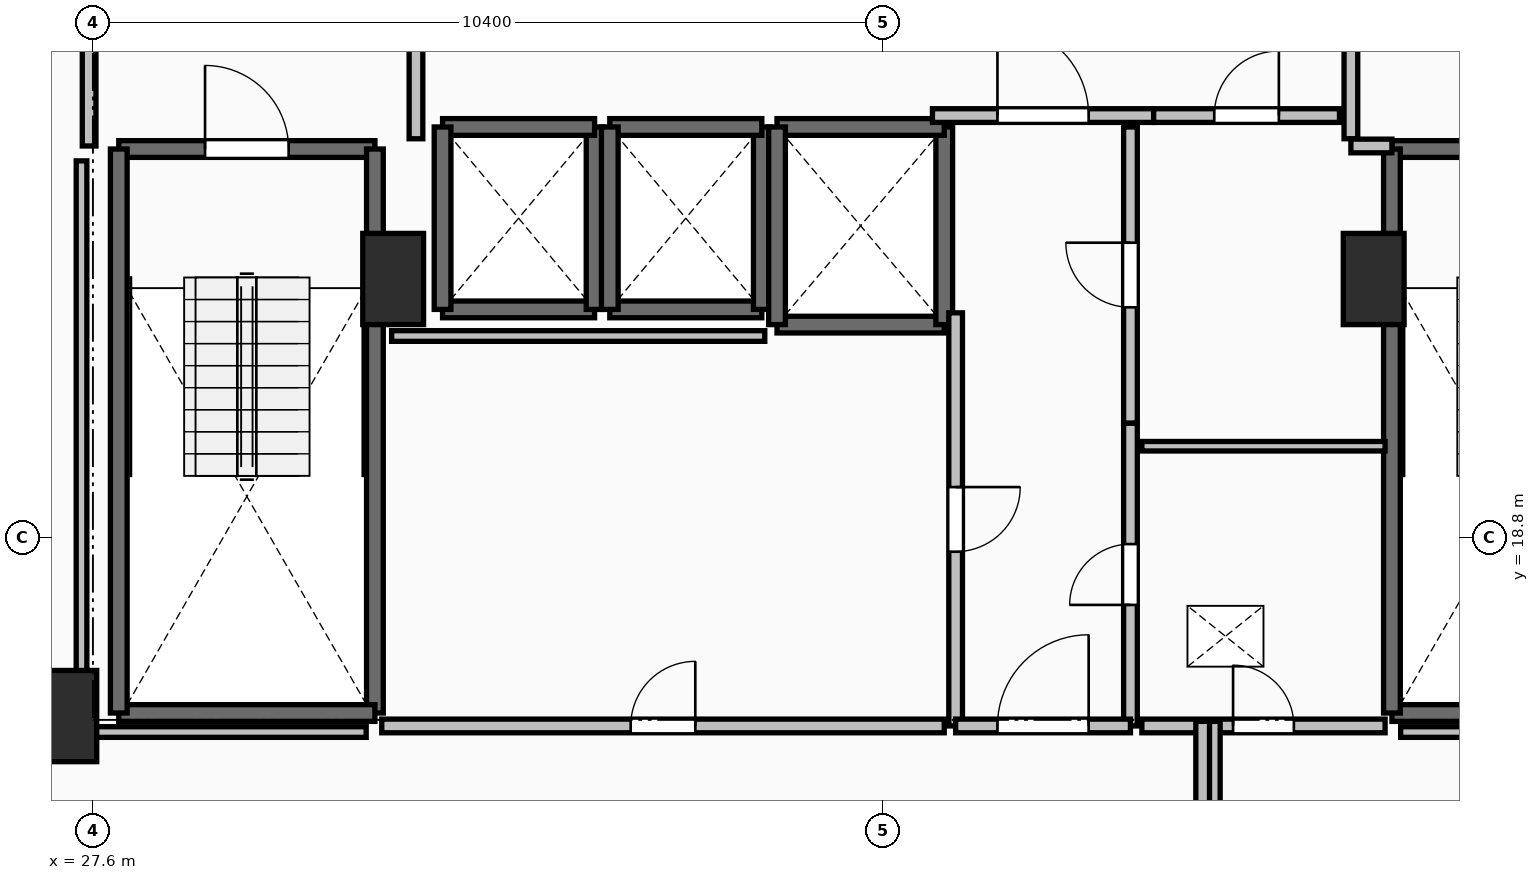
"""IFC4 building model, lengths in metres.
Left out: names, types, materials, properties, quantities, classifications, styles, units other than length and angle.
Written with IfcOpenShell. Run it as: python <this file> out.ifc"""

import sys

from ifc_helpers import new_model, si_unit, direction, frame, frame_2d, origin, origin_2d, place, context, subcontext, project, spatial, rectangle, extrude, element, fill, save


model = new_model("IFC4")
c1 = context("Model", 3, precision=1e-05, world=origin(), true_north=direction((0.0, 1.0)))
c2 = subcontext(c1, "Body", "Model", "MODEL_VIEW")
j1 = project(units=[si_unit("LENGTHUNIT", "METRE"), si_unit("PLANEANGLEUNIT", "RADIAN")], contexts=[c1])
p1 = place(None, origin())
s1 = spatial("IfcSite", under=j1, at=p1, CompositionType="ELEMENT")
p2 = place(p1, origin())
s2 = spatial("IfcBuilding", under=s1, at=p2, CompositionType="ELEMENT")
p3 = place(p2, frame((0.0, 0.0, 96.3)))
s3 = spatial("IfcBuildingStorey", under=s2, at=p3, CompositionType="ELEMENT", Elevation=96.3)
for number, where, z_axis, x_axis in (
    (1, (27.25, 16.45, 0.0), (0.0, 0.0, 1.0), (1.0, 0.0, 0.0)),
    (2, (31.55, 22.2, 0.0), (0.0, 0.0, 1.0), (1.0, 0.0, 0.0)),
    (3, (44.45, 22.2, 0.0), (0.0, 0.0, 1.0), (1.0, 0.0, 0.0)),
):
    element("IfcColumn", number, at=place(p3, frame(where, z_axis=z_axis, x_axis=x_axis)), inside=s3, PredefinedType="PILASTER", context=c2, shape_type="SweptSolid", body=[
        extrude(rectangle(XDim=0.8, YDim=1.2, at=origin_2d()), origin(), (0.0, 0.0, 1.0), 3.5),
    ])
p4 = place(p3, frame((27.94, 23.91, 0.0), z_axis=(0.0, 0.0, 1.0), x_axis=(1.0, 0.0, 0.0)))
e4 = element("IfcWall", 4, at=p4, inside=s3, PredefinedType="SOLIDWALL", context=c2, shape_type="SweptSolid", body=[
    extrude(rectangle(XDim=3.37, YDim=0.22, at=frame_2d((1.685, 0.0))), origin(), (0.0, 0.0, 1.0), 3.24),
])
p5 = place(p4, frame((1.135, 0.0, 0.0)))
e5 = element("IfcOpeningElement", 5, at=p5, cuts=e4, PredefinedType="OPENING", context=c2, shape_type="SweptSolid", body=[
    extrude(rectangle(XDim=1.1, YDim=2.15, at=frame_2d((0.55, 1.075))), frame((0.0, 0.125, 0.0), z_axis=(0.0, -1.0, 0.0), x_axis=(1.0, 0.0, 0.0)), (0.0, 0.0, 1.0), 0.25),
])
p6 = place(p3, frame((31.31, 23.91, 0.0), z_axis=(0.0, 0.0, 1.0), x_axis=(0.0, -1.0, 0.0)))
e6 = element("IfcWall", 6, at=p6, inside=s3, PredefinedType="SOLIDWALL", context=c2, shape_type="SweptSolid", body=[
    extrude(rectangle(XDim=7.42, YDim=0.22, at=frame_2d((3.71, 0.0))), origin(), (0.0, 0.0, 1.0), 3.24),
])
p7 = place(p3, frame((31.31, 16.49, 0.0), z_axis=(0.0, 0.0, 1.0), x_axis=(-1.0, 0.0, 0.0)))
e7 = element("IfcWall", 7, at=p7, inside=s3, PredefinedType="SOLIDWALL", context=c2, shape_type="SweptSolid", body=[
    extrude(rectangle(XDim=3.37, YDim=0.22, at=frame_2d((1.685, 0.0))), origin(), (0.0, 0.0, 1.0), 3.24),
])
p8 = place(p3, frame((27.94, 16.49, 0.0), z_axis=(0.0, 0.0, 1.0), x_axis=(0.0, 1.0, 0.0)))
e8 = element("IfcWall", 8, at=p8, inside=s3, PredefinedType="SOLIDWALL", context=c2, shape_type="SweptSolid", body=[
    extrude(rectangle(XDim=7.42, YDim=0.22, at=frame_2d((3.71, 0.0))), origin(), (0.0, 0.0, 1.0), 3.24),
])
p9 = place(p3, frame((44.69, 23.91, 0.0), z_axis=(0.0, 0.0, 1.0), x_axis=(1.0, 0.0, 0.0)))
e9 = element("IfcWall", 9, at=p9, inside=s3, PredefinedType="SOLIDWALL", context=c2, shape_type="SweptSolid", body=[
    extrude(rectangle(XDim=3.37, YDim=0.22, at=frame_2d((1.685, 0.0))), origin(), (0.0, 0.0, 1.0), 3.24),
])
p10 = place(p9, frame((1.135, 0.0, 0.0)))
e10 = element("IfcOpeningElement", 10, at=p10, cuts=e9, PredefinedType="OPENING", context=c2, shape_type="SweptSolid", body=[
    extrude(rectangle(XDim=1.1, YDim=2.15, at=frame_2d((0.55, 1.075))), frame((0.0, 0.125, 0.0), z_axis=(0.0, -1.0, 0.0), x_axis=(1.0, 0.0, 0.0)), (0.0, 0.0, 1.0), 0.25),
])
p11 = place(p3, frame((48.06, 16.49, 0.0), z_axis=(0.0, 0.0, 1.0), x_axis=(-1.0, 0.0, 0.0)))
e11 = element("IfcWall", 11, at=p11, inside=s3, PredefinedType="SOLIDWALL", context=c2, shape_type="SweptSolid", body=[
    extrude(rectangle(XDim=3.37, YDim=0.22, at=frame_2d((1.685, 0.0))), origin(), (0.0, 0.0, 1.0), 3.24),
])
p12 = place(p3, frame((44.69, 16.49, 0.0), z_axis=(0.0, 0.0, 1.0), x_axis=(0.0, 1.0, 0.0)))
e12 = element("IfcWall", 12, at=p12, inside=s3, PredefinedType="SOLIDWALL", context=c2, shape_type="SweptSolid", body=[
    extrude(rectangle(XDim=7.42, YDim=0.22, at=frame_2d((3.71, 0.0))), origin(), (0.0, 0.0, 1.0), 3.24),
])
p13 = place(p3, frame((32.2, 21.8, 0.0), z_axis=(0.0, 0.0, 1.0), x_axis=(1.0, 0.0, 0.0)))
e13 = element("IfcWall", 13, at=p13, inside=s3, PredefinedType="SOLIDWALL", context=c2, shape_type="SweptSolid", body=[
    extrude(rectangle(XDim=2.0, YDim=0.22, at=frame_2d((1.0, 0.0))), origin(), (0.0, 0.0, 1.0), 3.24),
])
p14 = place(p3, frame((34.2, 21.8, 0.0), z_axis=(0.0, 0.0, 1.0), x_axis=(0.0, 1.0, 0.0)))
e14 = element("IfcWall", 14, at=p14, inside=s3, PredefinedType="SOLIDWALL", context=c2, shape_type="SweptSolid", body=[
    extrude(rectangle(XDim=2.4, YDim=0.22, at=frame_2d((1.2, 0.0))), origin(), (0.0, 0.0, 1.0), 3.24),
])
p15 = place(p3, frame((34.2, 24.2, 0.0), z_axis=(0.0, 0.0, 1.0), x_axis=(-1.0, 0.0, 0.0)))
e15 = element("IfcWall", 15, at=p15, inside=s3, PredefinedType="SOLIDWALL", context=c2, shape_type="SweptSolid", body=[
    extrude(rectangle(XDim=2.0, YDim=0.22, at=frame_2d((1.0, 0.0))), origin(), (0.0, 0.0, 1.0), 3.24),
])
p16 = place(p3, frame((32.2, 24.2, 0.0), z_axis=(0.0, 0.0, 1.0), x_axis=(0.0, -1.0, 0.0)))
e16 = element("IfcWall", 16, at=p16, inside=s3, PredefinedType="SOLIDWALL", context=c2, shape_type="SweptSolid", body=[
    extrude(rectangle(XDim=2.4, YDim=0.22, at=frame_2d((1.2, 0.0))), origin(), (0.0, 0.0, 1.0), 3.24),
])
p17 = place(p3, frame((34.4, 21.8, 0.0), z_axis=(0.0, 0.0, 1.0), x_axis=(1.0, 0.0, 0.0)))
e17 = element("IfcWall", 17, at=p17, inside=s3, PredefinedType="SOLIDWALL", context=c2, shape_type="SweptSolid", body=[
    extrude(rectangle(XDim=2.0, YDim=0.22, at=frame_2d((1.0, 0.0))), origin(), (0.0, 0.0, 1.0), 3.24),
])
p18 = place(p3, frame((36.4, 21.8, 0.0), z_axis=(0.0, 0.0, 1.0), x_axis=(0.0, 1.0, 0.0)))
e18 = element("IfcWall", 18, at=p18, inside=s3, PredefinedType="SOLIDWALL", context=c2, shape_type="SweptSolid", body=[
    extrude(rectangle(XDim=2.4, YDim=0.22, at=frame_2d((1.2, 0.0))), origin(), (0.0, 0.0, 1.0), 3.24),
])
p19 = place(p3, frame((36.4, 24.2, 0.0), z_axis=(0.0, 0.0, 1.0), x_axis=(-1.0, 0.0, 0.0)))
e19 = element("IfcWall", 19, at=p19, inside=s3, PredefinedType="SOLIDWALL", context=c2, shape_type="SweptSolid", body=[
    extrude(rectangle(XDim=2.0, YDim=0.22, at=frame_2d((1.0, 0.0))), origin(), (0.0, 0.0, 1.0), 3.24),
])
p20 = place(p3, frame((34.4, 24.2, 0.0), z_axis=(0.0, 0.0, 1.0), x_axis=(0.0, -1.0, 0.0)))
e20 = element("IfcWall", 20, at=p20, inside=s3, PredefinedType="SOLIDWALL", context=c2, shape_type="SweptSolid", body=[
    extrude(rectangle(XDim=2.4, YDim=0.22, at=frame_2d((1.2, 0.0))), origin(), (0.0, 0.0, 1.0), 3.24),
])
p21 = place(p3, frame((36.6, 21.6, 0.0), z_axis=(0.0, 0.0, 1.0), x_axis=(1.0, 0.0, 0.0)))
e21 = element("IfcWall", 21, at=p21, inside=s3, PredefinedType="SOLIDWALL", context=c2, shape_type="SweptSolid", body=[
    extrude(rectangle(XDim=2.2, YDim=0.22, at=frame_2d((1.1, 0.0))), origin(), (0.0, 0.0, 1.0), 3.24),
])
p22 = place(p3, frame((38.8, 21.6, 0.0), z_axis=(0.0, 0.0, 1.0), x_axis=(0.0, 1.0, 0.0)))
e22 = element("IfcWall", 22, at=p22, inside=s3, PredefinedType="SOLIDWALL", context=c2, shape_type="SweptSolid", body=[
    extrude(rectangle(XDim=2.6, YDim=0.22, at=frame_2d((1.3, 0.0))), origin(), (0.0, 0.0, 1.0), 3.24),
])
p23 = place(p3, frame((38.8, 24.2, 0.0), z_axis=(0.0, 0.0, 1.0), x_axis=(-1.0, 0.0, 0.0)))
e23 = element("IfcWall", 23, at=p23, inside=s3, PredefinedType="SOLIDWALL", context=c2, shape_type="SweptSolid", body=[
    extrude(rectangle(XDim=2.2, YDim=0.22, at=frame_2d((1.1, 0.0))), origin(), (0.0, 0.0, 1.0), 3.24),
])
p24 = place(p3, frame((36.6, 24.2, 0.0), z_axis=(0.0, 0.0, 1.0), x_axis=(0.0, -1.0, 0.0)))
e24 = element("IfcWall", 24, at=p24, inside=s3, PredefinedType="SOLIDWALL", context=c2, shape_type="SweptSolid", body=[
    extrude(rectangle(XDim=2.6, YDim=0.22, at=frame_2d((1.3, 0.0))), origin(), (0.0, 0.0, 1.0), 3.24),
])
p25 = place(p3, frame((31.85, 24.045, 0.0), z_axis=(0.0, 0.0, 1.0), x_axis=(0.0, 1.0, 0.0)))
e25 = element("IfcWall", 25, at=p25, inside=s3, PredefinedType="PARTITIONING", context=c2, shape_type="SweptSolid", body=[
    extrude(rectangle(XDim=3.91, YDim=0.18, at=frame_2d((1.955, 0.0))), origin(), (0.0, 0.0, 1.0), 3.24),
])
p26 = place(p25, frame((1.355, 0.0, 0.0)))
e26 = element("IfcOpeningElement", 26, at=p26, cuts=e25, PredefinedType="OPENING", context=c2, shape_type="SweptSolid", body=[
    extrude(rectangle(XDim=1.2, YDim=2.15, at=frame_2d((0.6, 1.075))), frame((0.0, 0.105, 0.0), z_axis=(0.0, -1.0, 0.0), x_axis=(1.0, 0.0, 0.0)), (0.0, 0.0, 1.0), 0.21),
])
p27 = place(p3, frame((27.55, 28.0, 0.0), z_axis=(0.0, 0.0, 1.0), x_axis=(0.0, -1.0, 0.0)))
e27 = element("IfcWall", 27, at=p27, inside=s3, PredefinedType="PARTITIONING", context=c2, shape_type="SweptSolid", body=[
    extrude(rectangle(XDim=4.05, YDim=0.18, at=frame_2d((2.025, 0.0))), origin(), (0.0, 0.0, 1.0), 3.24),
])
p28 = place(p27, frame((1.425, 0.0, 0.0)))
e28 = element("IfcOpeningElement", 28, at=p28, cuts=e27, PredefinedType="OPENING", context=c2, shape_type="SweptSolid", body=[
    extrude(rectangle(XDim=1.2, YDim=2.15, at=frame_2d((0.6, 1.075))), frame((0.0, 0.105, 0.0), z_axis=(0.0, -1.0, 0.0), x_axis=(1.0, 0.0, 0.0)), (0.0, 0.0, 1.0), 0.21),
])
p29 = place(p3, frame((44.15, 27.955, 0.0), z_axis=(0.0, 0.0, 1.0), x_axis=(0.0, -1.0, 0.0)))
e29 = element("IfcWall", 29, at=p29, inside=s3, PredefinedType="PARTITIONING", context=c2, shape_type="SweptSolid", body=[
    extrude(rectangle(XDim=3.91, YDim=0.18, at=frame_2d((1.955, 0.0))), origin(), (0.0, 0.0, 1.0), 3.24),
])
p30 = place(p29, frame((1.355, 0.0, 0.0)))
e30 = element("IfcOpeningElement", 30, at=p30, cuts=e29, PredefinedType="OPENING", context=c2, shape_type="SweptSolid", body=[
    extrude(rectangle(XDim=1.2, YDim=2.15, at=frame_2d((0.6, 1.075))), frame((0.0, 0.105, 0.0), z_axis=(0.0, -1.0, 0.0), x_axis=(1.0, 0.0, 0.0)), (0.0, 0.0, 1.0), 0.21),
])
p31 = place(p3, frame((44.15, 23.95, 0.0), z_axis=(0.0, 0.0, 1.0), x_axis=(1.0, 0.0, 0.0)))
e31 = element("IfcWall", 31, at=p31, inside=s3, PredefinedType="PARTITIONING", context=c2, shape_type="SweptSolid", body=[
    extrude(rectangle(XDim=0.54, YDim=0.18, at=frame_2d((0.27, 0.0))), origin(), (0.0, 0.0, 1.0), 3.24),
])
p32 = place(p3, frame((38.645, 24.35, 0.0), z_axis=(0.0, 0.0, 1.0), x_axis=(1.0, 0.0, 0.0)))
e32 = element("IfcWall", 32, at=p32, inside=s3, PredefinedType="PARTITIONING", context=c2, shape_type="SweptSolid", body=[
    extrude(rectangle(XDim=2.91, YDim=0.18, at=frame_2d((1.455, 0.0))), origin(), (0.0, 0.0, 1.0), 3.24),
])
p33 = place(p32, frame((0.855, 0.0, 0.0)))
e33 = element("IfcOpeningElement", 33, at=p33, cuts=e32, PredefinedType="OPENING", context=c2, shape_type="SweptSolid", body=[
    extrude(rectangle(XDim=1.2, YDim=2.15, at=frame_2d((0.6, 1.075))), frame((0.0, 0.105, 0.0), z_axis=(0.0, -1.0, 0.0), x_axis=(1.0, 0.0, 0.0)), (0.0, 0.0, 1.0), 0.21),
])
p34 = place(p3, frame((41.555, 24.35, 0.0), z_axis=(0.0, 0.0, 1.0), x_axis=(1.0, 0.0, 0.0)))
e34 = element("IfcWall", 34, at=p34, inside=s3, PredefinedType="PARTITIONING", context=c2, shape_type="SweptSolid", body=[
    extrude(rectangle(XDim=2.445, YDim=0.18, at=frame_2d((1.223, 0.0))), origin(), (0.0, 0.0, 1.0), 3.24),
])
p35 = place(p34, frame((0.798, 0.0, 0.0)))
e35 = element("IfcOpeningElement", 35, at=p35, cuts=e34, PredefinedType="OPENING", context=c2, shape_type="SweptSolid", body=[
    extrude(rectangle(XDim=0.85, YDim=2.1, at=frame_2d((0.425, 1.05))), frame((0.0, 0.105, 0.0), z_axis=(0.0, -1.0, 0.0), x_axis=(1.0, 0.0, 0.0)), (0.0, 0.0, 1.0), 0.21),
])
p36 = place(p3, frame((41.25, 16.32, 0.0), z_axis=(0.0, 0.0, 1.0), x_axis=(0.0, 1.0, 0.0)))
e36 = element("IfcWall", 36, at=p36, inside=s3, PredefinedType="PARTITIONING", context=c2, shape_type="SweptSolid", body=[
    extrude(rectangle(XDim=3.985, YDim=0.18, at=frame_2d((1.992, 0.0))), origin(), (0.0, 0.0, 1.0), 3.24),
])
p37 = place(p36, frame((1.593, 0.0, 0.0)))
e37 = element("IfcOpeningElement", 37, at=p37, cuts=e36, PredefinedType="OPENING", context=c2, shape_type="SweptSolid", body=[
    extrude(rectangle(XDim=0.8, YDim=2.05, at=frame_2d((0.4, 1.025))), frame((0.0, 0.105, 0.0), z_axis=(0.0, -1.0, 0.0), x_axis=(1.0, 0.0, 0.0)), (0.0, 0.0, 1.0), 0.21),
])
p38 = place(p3, frame((41.25, 20.305, 0.0), z_axis=(0.0, 0.0, 1.0), x_axis=(0.0, 1.0, 0.0)))
e38 = element("IfcWall", 38, at=p38, inside=s3, PredefinedType="PARTITIONING", context=c2, shape_type="SweptSolid", body=[
    extrude(rectangle(XDim=3.895, YDim=0.18, at=frame_2d((1.948, 0.0))), origin(), (0.0, 0.0, 1.0), 3.24),
])
p39 = place(p38, frame((1.522, 0.0, 0.0)))
e39 = element("IfcOpeningElement", 39, at=p39, cuts=e38, PredefinedType="OPENING", context=c2, shape_type="SweptSolid", body=[
    extrude(rectangle(XDim=0.85, YDim=2.1, at=frame_2d((0.425, 1.05))), frame((0.0, 0.105, 0.0), z_axis=(0.0, -1.0, 0.0), x_axis=(1.0, 0.0, 0.0)), (0.0, 0.0, 1.0), 0.21),
])
p40 = place(p3, frame((38.95, 21.755, 0.0), z_axis=(0.0, 0.0, 1.0), x_axis=(0.0, -1.0, 0.0)))
e40 = element("IfcWall", 40, at=p40, inside=s3, PredefinedType="PARTITIONING", context=c2, shape_type="SweptSolid", body=[
    extrude(rectangle(XDim=5.435, YDim=0.18, at=frame_2d((2.717, 0.0))), origin(), (0.0, 0.0, 1.0), 3.24),
])
p41 = place(p40, frame((2.292, 0.0, 0.0)))
e41 = element("IfcOpeningElement", 41, at=p41, cuts=e40, PredefinedType="OPENING", context=c2, shape_type="SweptSolid", body=[
    extrude(rectangle(XDim=0.85, YDim=2.1, at=frame_2d((0.425, 1.05))), frame((0.0, 0.105, 0.0), z_axis=(0.0, -1.0, 0.0), x_axis=(1.0, 0.0, 0.0)), (0.0, 0.0, 1.0), 0.21),
])
p42 = place(p3, frame((38.95, 16.32, 0.0), z_axis=(0.0, 0.0, 1.0), x_axis=(1.0, 0.0, 0.0)))
e42 = element("IfcWall", 42, at=p42, inside=s3, PredefinedType="PARTITIONING", context=c2, shape_type="SweptSolid", body=[
    extrude(rectangle(XDim=2.3, YDim=0.18, at=frame_2d((1.15, 0.0))), origin(), (0.0, 0.0, 1.0), 3.24),
])
p43 = place(p42, frame((0.55, 0.0, 0.0)))
e43 = element("IfcOpeningElement", 43, at=p43, cuts=e42, PredefinedType="OPENING", context=c2, shape_type="SweptSolid", body=[
    extrude(rectangle(XDim=1.2, YDim=2.15, at=frame_2d((0.6, 1.075))), frame((0.0, 0.105, 0.0), z_axis=(0.0, -1.0, 0.0), x_axis=(1.0, 0.0, 0.0)), (0.0, 0.0, 1.0), 0.21),
])
p44 = place(p3, frame((44.6, 20.0, 0.0), z_axis=(0.0, 0.0, 1.0), x_axis=(-1.0, 0.0, 0.0)))
e44 = element("IfcWall", 44, at=p44, inside=s3, PredefinedType="PARTITIONING", context=c2, shape_type="SweptSolid", body=[
    extrude(rectangle(XDim=3.2, YDim=0.125, at=frame_2d((1.6, 0.0))), origin(), (0.0, 0.0, 1.0), 3.24),
])
p45 = place(p3, frame((41.4, 16.32, 0.0), z_axis=(0.0, 0.0, 1.0), x_axis=(1.0, 0.0, 0.0)))
e45 = element("IfcWall", 45, at=p45, inside=s3, PredefinedType="PARTITIONING", context=c2, shape_type="SweptSolid", body=[
    extrude(rectangle(XDim=3.2, YDim=0.18, at=frame_2d((1.6, 0.0))), origin(), (0.0, 0.0, 1.0), 3.24),
])
p46 = place(p45, frame((1.2, 0.0, 0.0)))
e46 = element("IfcOpeningElement", 46, at=p46, cuts=e45, PredefinedType="OPENING", context=c2, shape_type="SweptSolid", body=[
    extrude(rectangle(XDim=0.8, YDim=2.05, at=frame_2d((0.4, 1.025))), frame((0.0, 0.105, 0.0), z_axis=(0.0, -1.0, 0.0), x_axis=(1.0, 0.0, 0.0)), (0.0, 0.0, 1.0), 0.21),
])
p47 = place(p3, frame((31.4, 16.32, 0.0), z_axis=(0.0, 0.0, 1.0), x_axis=(1.0, 0.0, 0.0)))
e47 = element("IfcWall", 47, at=p47, inside=s3, PredefinedType="PARTITIONING", context=c2, shape_type="SweptSolid", body=[
    extrude(rectangle(XDim=7.4, YDim=0.18, at=frame_2d((3.7, 0.0))), origin(), (0.0, 0.0, 1.0), 3.24),
])
p48 = place(p47, frame((3.275, 0.0, 0.0)))
e48 = element("IfcOpeningElement", 48, at=p48, cuts=e47, PredefinedType="OPENING", context=c2, shape_type="SweptSolid", body=[
    extrude(rectangle(XDim=0.85, YDim=2.1, at=frame_2d((0.425, 1.05))), frame((0.0, 0.105, 0.0), z_axis=(0.0, -1.0, 0.0), x_axis=(1.0, 0.0, 0.0)), (0.0, 0.0, 1.0), 0.21),
])
for number, where, z_axis, x_axis in (
    (49, (42.34, 16.38, 0.0), (0.0, 0.0, 1.0), (0.0, -1.0, 0.0)),
    (50, (42.2, 13.96, 0.0), (0.0, 0.0, 1.0), (0.0, 1.0, 0.0)),
):
    element("IfcWall", number, at=place(p3, frame(where, z_axis=z_axis, x_axis=x_axis)), inside=s3, PredefinedType="PARTITIONING", context=c2, shape_type="SweptSolid", body=[
        extrude(rectangle(XDim=2.42, YDim=0.18, at=frame_2d((1.21, 0.0))), origin(), (0.0, 0.0, 1.0), 2.972),
    ])
p49 = place(p3, frame((36.439, 21.45, 0.0), z_axis=(0.0, 0.0, 1.0), x_axis=(-1.0, 0.0, 0.0)))
e51 = element("IfcWall", 51, at=p49, inside=s3, PredefinedType="PARTITIONING", context=c2, shape_type="SweptSolid", body=[
    extrude(rectangle(XDim=4.909, YDim=0.14, at=frame_2d((2.455, 0.0))), origin(), (0.0, 0.0, 1.0), 3.24),
])
for number, where, z_axis, x_axis in (
    (52, (48.55, 16.24, 0.0), (0.0, 0.0, 1.0), (-1.0, 0.0, 0.0)),
    (53, (31.195, 16.24, 0.0), (0.0, 0.0, 1.0), (-1.0, 0.0, 0.0)),
):
    element("IfcWall", number, at=place(p3, frame(where, z_axis=z_axis, x_axis=x_axis)), inside=s3, PredefinedType="PARTITIONING", context=c2, shape_type="SweptSolid", body=[
        extrude(rectangle(XDim=3.745, YDim=0.14, at=frame_2d((1.873, 0.0))), origin(), (0.0, 0.0, 1.0), 2.432),
    ])
p50 = place(p3, frame((27.45, 16.24, 0.0), z_axis=(0.0, 0.0, 1.0), x_axis=(0.0, 1.0, 0.0)))
e54 = element("IfcWall", 54, at=p50, inside=s3, PredefinedType="PARTITIONING", context=c2, shape_type="SweptSolid", body=[
    extrude(rectangle(XDim=7.514, YDim=0.14, at=frame_2d((3.757, 0.0))), origin(), (0.0, 0.0, 1.0), 2.432),
])
p51 = place(p5, origin())
e55 = element("IfcDoor", 55, at=p51, inside=s3, OperationType="SINGLE_SWING_LEFT", PredefinedType="DOOR", context=c2, shape_type="SweptSolid", body=[
    extrude(rectangle(XDim=1.1, YDim=2.15, at=frame_2d((0.55, 1.075))), frame((0.0, 0.025, 0.0), z_axis=(0.0, -1.0, 0.0), x_axis=(1.0, 0.0, 0.0)), (0.0, 0.0, 1.0), 0.05),
])
fill(e5, e55)
p52 = place(p33, origin())
e56 = element("IfcDoor", 56, at=p52, inside=s3, OperationType="SINGLE_SWING_LEFT", PredefinedType="DOOR", context=c2, shape_type="SweptSolid", body=[
    extrude(rectangle(XDim=1.2, YDim=2.15, at=frame_2d((0.6, 1.075))), frame((0.0, 0.025, 0.0), z_axis=(0.0, -1.0, 0.0), x_axis=(1.0, 0.0, 0.0)), (0.0, 0.0, 1.0), 0.05),
])
fill(e33, e56)
p53 = place(p35, origin())
e57 = element("IfcDoor", 57, at=p53, inside=s3, OperationType="SINGLE_SWING_RIGHT", PredefinedType="DOOR", context=c2, shape_type="SweptSolid", body=[
    extrude(rectangle(XDim=0.85, YDim=2.1, at=frame_2d((0.425, 1.05))), frame((0.0, 0.025, 0.0), z_axis=(0.0, -1.0, 0.0), x_axis=(1.0, 0.0, 0.0)), (0.0, 0.0, 1.0), 0.05),
])
fill(e35, e57)
p54 = place(p37, origin())
e58 = element("IfcDoor", 58, at=p54, inside=s3, OperationType="SINGLE_SWING_LEFT", PredefinedType="DOOR", context=c2, shape_type="SweptSolid", body=[
    extrude(rectangle(XDim=0.8, YDim=2.05, at=frame_2d((0.4, 1.025))), frame((0.0, 0.025, 0.0), z_axis=(0.0, -1.0, 0.0), x_axis=(1.0, 0.0, 0.0)), (0.0, 0.0, 1.0), 0.05),
])
fill(e37, e58)
p55 = place(p39, origin())
e59 = element("IfcDoor", 59, at=p55, inside=s3, OperationType="SINGLE_SWING_RIGHT", PredefinedType="DOOR", context=c2, shape_type="SweptSolid", body=[
    extrude(rectangle(XDim=0.85, YDim=2.1, at=frame_2d((0.425, 1.05))), frame((0.0, 0.025, 0.0), z_axis=(0.0, -1.0, 0.0), x_axis=(1.0, 0.0, 0.0)), (0.0, 0.0, 1.0), 0.05),
])
fill(e39, e59)
p56 = place(p41, origin())
e60 = element("IfcDoor", 60, at=p56, inside=s3, OperationType="SINGLE_SWING_LEFT", PredefinedType="DOOR", context=c2, shape_type="SweptSolid", body=[
    extrude(rectangle(XDim=0.85, YDim=2.1, at=frame_2d((0.425, 1.05))), frame((0.0, 0.025, 0.0), z_axis=(0.0, -1.0, 0.0), x_axis=(1.0, 0.0, 0.0)), (0.0, 0.0, 1.0), 0.05),
])
fill(e41, e60)
p57 = place(p43, origin())
e61 = element("IfcDoor", 61, at=p57, inside=s3, OperationType="SINGLE_SWING_RIGHT", PredefinedType="DOOR", context=c2, shape_type="SweptSolid", body=[
    extrude(rectangle(XDim=1.2, YDim=2.15, at=frame_2d((0.6, 1.075))), frame((0.0, 0.025, 0.0), z_axis=(0.0, -1.0, 0.0), x_axis=(1.0, 0.0, 0.0)), (0.0, 0.0, 1.0), 0.05),
])
fill(e43, e61)
p58 = place(p46, origin())
e62 = element("IfcDoor", 62, at=p58, inside=s3, OperationType="SINGLE_SWING_LEFT", PredefinedType="DOOR", context=c2, shape_type="SweptSolid", body=[
    extrude(rectangle(XDim=0.8, YDim=2.05, at=frame_2d((0.4, 1.025))), frame((0.0, 0.025, 0.0), z_axis=(0.0, -1.0, 0.0), x_axis=(1.0, 0.0, 0.0)), (0.0, 0.0, 1.0), 0.05),
])
fill(e46, e62)
p59 = place(p48, origin())
e63 = element("IfcDoor", 63, at=p59, inside=s3, OperationType="SINGLE_SWING_RIGHT", PredefinedType="DOOR", context=c2, shape_type="SweptSolid", body=[
    extrude(rectangle(XDim=0.85, YDim=2.1, at=frame_2d((0.425, 1.05))), frame((0.0, 0.025, 0.0), z_axis=(0.0, -1.0, 0.0), x_axis=(1.0, 0.0, 0.0)), (0.0, 0.0, 1.0), 0.05),
])
fill(e48, e63)
save(model, sys.argv[1])
